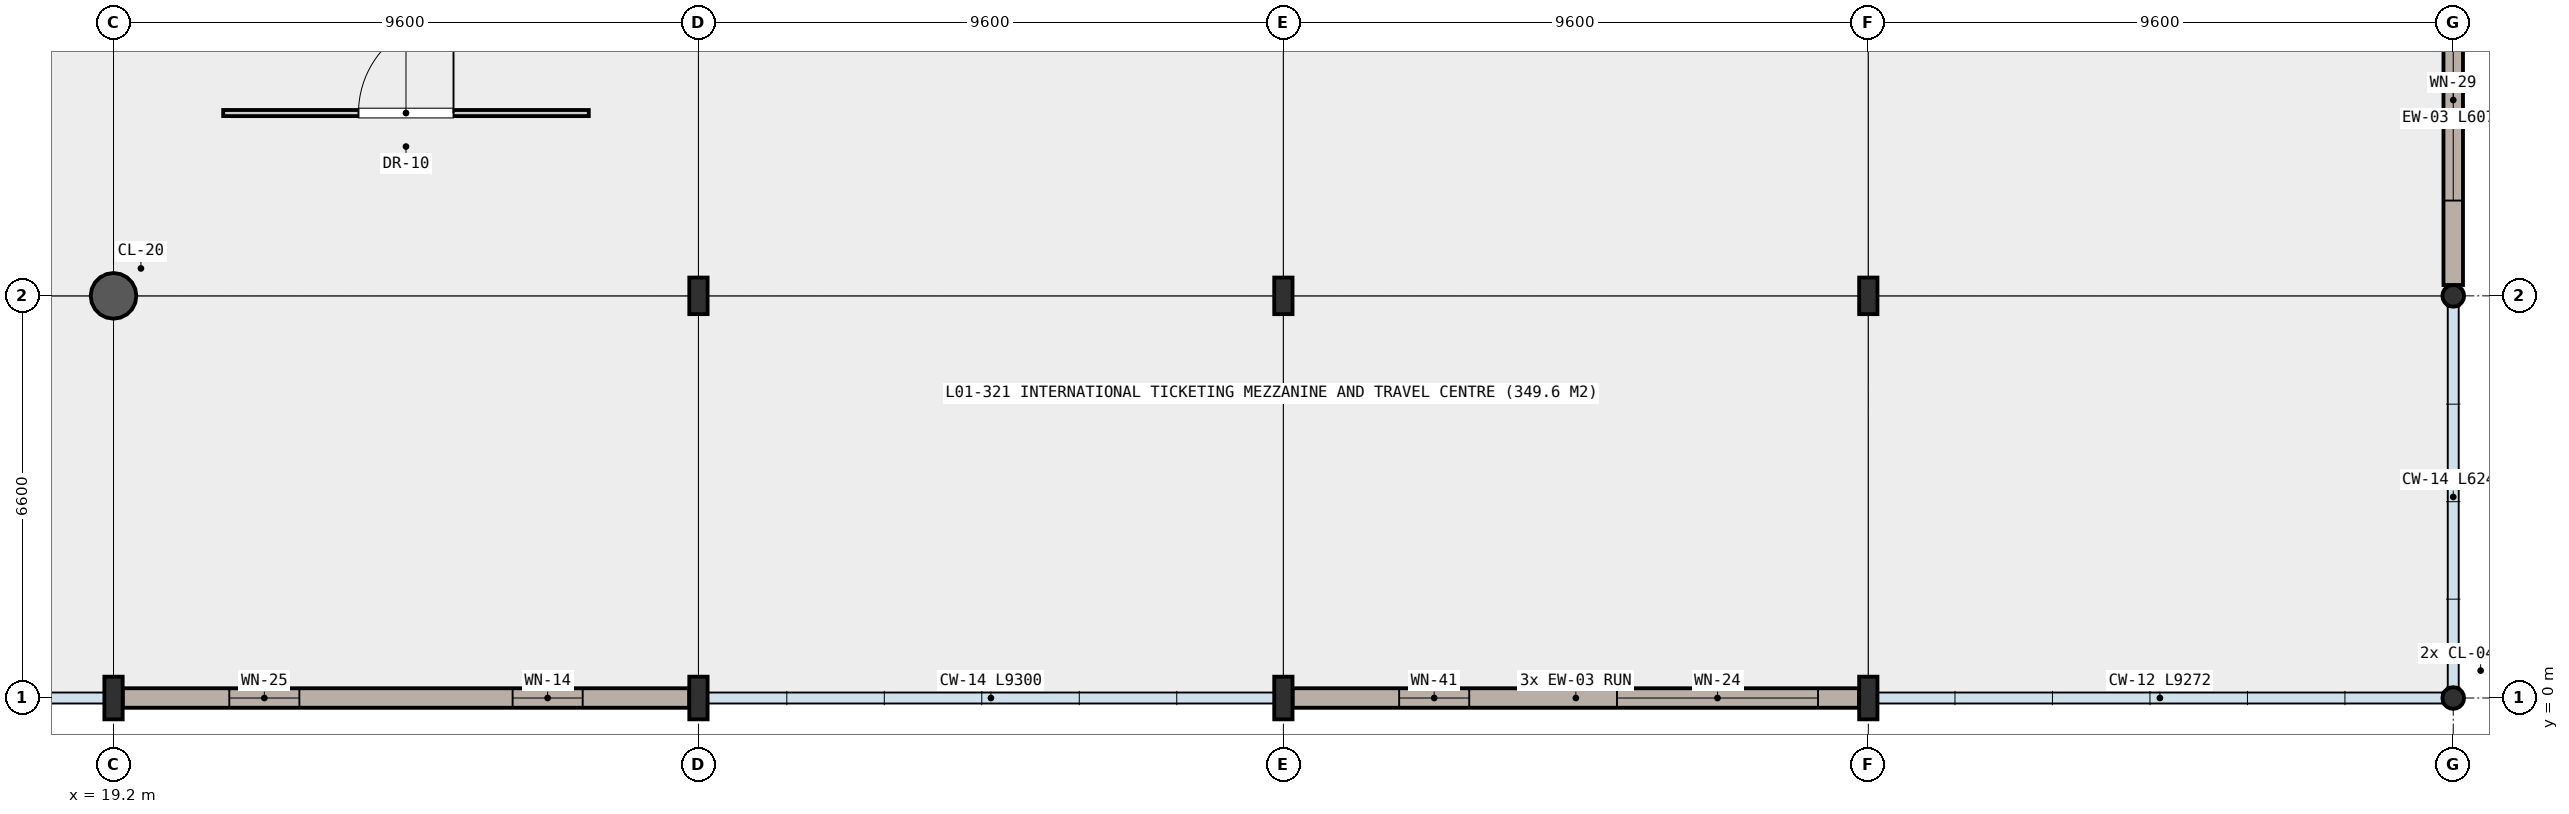
"""IFC4 building model, lengths in metres.
Left out: names, types, materials, properties, quantities, classifications, styles, units other than length and angle.
Written with IfcOpenShell. Run it as: python <this file> out.ifc"""

import sys

from ifc_helpers import new_model, si_unit, direction, frame, frame_2d, origin, origin_2d, place, context, subcontext, project, spatial, rectangle, circle, hollow_circle, i_section, extrude, element, fill, save


model = new_model("IFC4")
c1 = context("Model", 3, precision=1e-05, world=origin(), true_north=direction((0.0, 1.0)))
c2 = subcontext(c1, "Body", "Model", "MODEL_VIEW")
j1 = project(units=[si_unit("LENGTHUNIT", "METRE"), si_unit("PLANEANGLEUNIT", "RADIAN")], contexts=[c1])
p1 = place(None, origin())
s1 = spatial("IfcSite", under=j1, at=p1, CompositionType="ELEMENT")
p2 = place(p1, origin())
s2 = spatial("IfcBuilding", under=s1, at=p2, CompositionType="ELEMENT")
p3 = place(p2, frame((0.0, 0.0, 5.4)))
s3 = spatial("IfcBuildingStorey", under=s2, at=p3, CompositionType="ELEMENT", Elevation=5.4)
p4 = place(p3, frame((19.2, 0.0, 0.0), z_axis=(0.0, 0.0, 1.0), x_axis=(1.0, 0.0, 0.0)))
e1 = element("IfcColumn", 1, at=p4, inside=s3, PredefinedType="COLUMN", context=c2, shape_type="SweptSolid", body=[
    extrude(i_section(OverallWidth=0.3, OverallDepth=0.7, WebThickness=0.017, FlangeThickness=0.032, FilletRadius=0.027, at=origin_2d()), origin(), (0.0, 0.0, 1.0), 4.8),
])
p5 = place(p3, frame((19.2, 6.6, 0.0), z_axis=(0.0, 0.0, 1.0), x_axis=(1.0, 0.0, 0.0)))
e2 = element("IfcColumn", 2, at=p5, inside=s3, PredefinedType="COLUMN", context=c2, shape_type="SweptSolid", body=[
    extrude(circle(Radius=0.375, at=origin_2d()), origin(), (0.0, 0.0, 1.0), 4.8),
])
p6 = place(p3, frame((28.8, 0.0, 0.0), z_axis=(0.0, 0.0, 1.0), x_axis=(1.0, 0.0, 0.0)))
e3 = element("IfcColumn", 3, at=p6, inside=s3, PredefinedType="COLUMN", context=c2, shape_type="SweptSolid", body=[
    extrude(i_section(OverallWidth=0.3, OverallDepth=0.7, WebThickness=0.017, FlangeThickness=0.032, FilletRadius=0.027, at=origin_2d()), origin(), (0.0, 0.0, 1.0), 4.8),
])
p7 = place(p3, frame((28.8, 6.6, 0.0), z_axis=(0.0, 0.0, 1.0), x_axis=(1.0, 0.0, 0.0)))
e4 = element("IfcColumn", 4, at=p7, inside=s3, PredefinedType="COLUMN", context=c2, shape_type="SweptSolid", body=[
    extrude(i_section(OverallWidth=0.3, OverallDepth=0.6, WebThickness=0.015, FlangeThickness=0.03, FilletRadius=0.027, at=origin_2d()), origin(), (0.0, 0.0, 1.0), 4.8),
])
p8 = place(p3, frame((38.4, 0.0, 0.0), z_axis=(0.0, 0.0, 1.0), x_axis=(1.0, 0.0, 0.0)))
e5 = element("IfcColumn", 5, at=p8, inside=s3, PredefinedType="COLUMN", context=c2, shape_type="SweptSolid", body=[
    extrude(i_section(OverallWidth=0.3, OverallDepth=0.7, WebThickness=0.017, FlangeThickness=0.032, FilletRadius=0.027, at=origin_2d()), origin(), (0.0, 0.0, 1.0), 4.8),
])
p9 = place(p3, frame((38.4, 6.6, 0.0), z_axis=(0.0, 0.0, 1.0), x_axis=(1.0, 0.0, 0.0)))
e6 = element("IfcColumn", 6, at=p9, inside=s3, PredefinedType="COLUMN", context=c2, shape_type="SweptSolid", body=[
    extrude(i_section(OverallWidth=0.3, OverallDepth=0.6, WebThickness=0.015, FlangeThickness=0.03, FilletRadius=0.027, at=origin_2d()), origin(), (0.0, 0.0, 1.0), 4.8),
])
p10 = place(p3, frame((48.0, 0.0, 0.0), z_axis=(0.0, 0.0, 1.0), x_axis=(1.0, 0.0, 0.0)))
e7 = element("IfcColumn", 7, at=p10, inside=s3, PredefinedType="COLUMN", context=c2, shape_type="SweptSolid", body=[
    extrude(i_section(OverallWidth=0.3, OverallDepth=0.7, WebThickness=0.017, FlangeThickness=0.032, FilletRadius=0.027, at=origin_2d()), origin(), (0.0, 0.0, 1.0), 4.8),
])
p11 = place(p3, frame((48.0, 6.6, 0.0), z_axis=(0.0, 0.0, 1.0), x_axis=(1.0, 0.0, 0.0)))
e8 = element("IfcColumn", 8, at=p11, inside=s3, PredefinedType="COLUMN", context=c2, shape_type="SweptSolid", body=[
    extrude(i_section(OverallWidth=0.3, OverallDepth=0.6, WebThickness=0.015, FlangeThickness=0.03, FilletRadius=0.027, at=origin_2d()), origin(), (0.0, 0.0, 1.0), 4.8),
])
for number, where, z_axis, x_axis in (
    (9, (57.6, 0.0, 0.0), (0.0, 0.0, 1.0), (1.0, 0.0, 0.0)),
    (10, (57.6, 6.6, 0.0), (0.0, 0.0, 1.0), (1.0, 0.0, 0.0)),
):
    element("IfcColumn", number, at=place(p3, frame(where, z_axis=z_axis, x_axis=x_axis)), inside=s3, PredefinedType="COLUMN", context=c2, shape_type="SweptSolid", body=[
        extrude(hollow_circle(Radius=0.178, WallThickness=0.016, at=origin_2d()), origin(), (0.0, 0.0, 1.0), 4.788),
    ])
p12 = place(p3, frame((57.6, 12.85, 0.0), z_axis=(0.0, 0.0, 1.0), x_axis=(0.0, -1.0, 0.0)))
e11 = element("IfcWall", 11, at=p12, inside=s3, PredefinedType="SOLIDWALL", context=c2, shape_type="SweptSolid", body=[
    extrude(rectangle(XDim=6.072, YDim=0.32, at=frame_2d((3.036, 0.0))), origin(), (0.0, 0.0, 1.0), 4.05),
])
p13 = place(p12, frame((1.386, 0.0, 0.85)))
e12 = element("IfcOpeningElement", 12, at=p13, cuts=e11, PredefinedType="OPENING", context=c2, shape_type="SweptSolid", body=[
    extrude(rectangle(XDim=3.3, YDim=1.85, at=frame_2d((1.65, 0.925))), frame((0.0, 0.17, 0.0), z_axis=(0.0, -1.0, 0.0), x_axis=(1.0, 0.0, 0.0)), (0.0, 0.0, 1.0), 0.34),
])
p14 = place(p3, frame((47.85, 0.0, 0.0), z_axis=(0.0, 0.0, 1.0), x_axis=(-1.0, 0.0, 0.0)))
e13 = element("IfcWall", 13, at=p14, inside=s3, PredefinedType="SOLIDWALL", context=c2, shape_type="SweptSolid", body=[
    extrude(rectangle(XDim=9.3, YDim=0.32, at=frame_2d((4.65, 0.0))), origin(), (0.0, 0.0, 1.0), 4.11),
])
p15 = place(p14, frame((0.675, 0.0, 0.85)))
e14 = element("IfcOpeningElement", 14, at=p15, cuts=e13, PredefinedType="OPENING", context=c2, shape_type="SweptSolid", body=[
    extrude(rectangle(XDim=3.3, YDim=2.15, at=frame_2d((1.65, 1.075))), frame((0.0, 0.17, 0.0), z_axis=(0.0, -1.0, 0.0), x_axis=(1.0, 0.0, 0.0)), (0.0, 0.0, 1.0), 0.34),
])
p16 = place(p14, frame((6.4, 0.0, 0.85)))
e15 = element("IfcOpeningElement", 15, at=p16, cuts=e13, PredefinedType="OPENING", context=c2, shape_type="SweptSolid", body=[
    extrude(rectangle(XDim=1.15, YDim=1.5, at=frame_2d((0.575, 0.75))), frame((0.0, 0.17, 0.0), z_axis=(0.0, -1.0, 0.0), x_axis=(1.0, 0.0, 0.0)), (0.0, 0.0, 1.0), 0.34),
])
p17 = place(p3, frame((28.65, 0.0, 0.0), z_axis=(0.0, 0.0, 1.0), x_axis=(-1.0, 0.0, 0.0)))
e16 = element("IfcWall", 16, at=p17, inside=s3, PredefinedType="SOLIDWALL", context=c2, shape_type="SweptSolid", body=[
    extrude(rectangle(XDim=9.3, YDim=0.32, at=frame_2d((4.65, 0.0))), origin(), (0.0, 0.0, 1.0), 4.11),
])
p18 = place(p17, frame((1.75, 0.0, 0.85)))
e17 = element("IfcOpeningElement", 17, at=p18, cuts=e16, PredefinedType="OPENING", context=c2, shape_type="SweptSolid", body=[
    extrude(rectangle(XDim=1.15, YDim=1.85, at=frame_2d((0.575, 0.925))), frame((0.0, 0.17, 0.0), z_axis=(0.0, -1.0, 0.0), x_axis=(1.0, 0.0, 0.0)), (0.0, 0.0, 1.0), 0.34),
])
p19 = place(p17, frame((6.4, 0.0, 0.85)))
e18 = element("IfcOpeningElement", 18, at=p19, cuts=e16, PredefinedType="OPENING", context=c2, shape_type="SweptSolid", body=[
    extrude(rectangle(XDim=1.15, YDim=2.15, at=frame_2d((0.575, 1.075))), frame((0.0, 0.17, 0.0), z_axis=(0.0, -1.0, 0.0), x_axis=(1.0, 0.0, 0.0)), (0.0, 0.0, 1.0), 0.34),
])
p20 = place(p3, frame((21.0, 9.6, 0.0), z_axis=(0.0, 0.0, 1.0), x_axis=(1.0, 0.0, 0.0)))
e19 = element("IfcWall", 19, at=p20, inside=s3, PredefinedType="PARTITIONING", context=c2, shape_type="SweptSolid", body=[
    extrude(rectangle(XDim=6.0, YDim=0.1, at=frame_2d((3.0, 0.0))), origin(), (0.0, 0.0, 1.0), 4.54),
])
p21 = place(p20, frame((2.22, 0.0, 0.0)))
e20 = element("IfcOpeningElement", 20, at=p21, cuts=e19, PredefinedType="OPENING", context=c2, shape_type="SweptSolid", body=[
    extrude(rectangle(XDim=1.56, YDim=2.2, at=frame_2d((0.78, 1.1))), frame((0.0, 0.06, 0.0), z_axis=(0.0, -1.0, 0.0), x_axis=(1.0, 0.0, 0.0)), (0.0, 0.0, 1.0), 0.12),
])
p22 = place(p13, origin())
e21 = element("IfcWindow", 21, at=p22, inside=s3, PartitioningType="SINGLE_PANEL", PredefinedType="WINDOW", context=c2, shape_type="SweptSolid", body=[
    extrude(rectangle(XDim=3.3, YDim=1.85, at=frame_2d((1.65, 0.925))), frame((0.0, 0.03, 0.0), z_axis=(0.0, -1.0, 0.0), x_axis=(1.0, 0.0, 0.0)), (0.0, 0.0, 1.0), 0.06),
])
fill(e12, e21)
p23 = place(p15, origin())
e22 = element("IfcWindow", 22, at=p23, inside=s3, PartitioningType="SINGLE_PANEL", PredefinedType="WINDOW", context=c2, shape_type="SweptSolid", body=[
    extrude(rectangle(XDim=3.3, YDim=2.15, at=frame_2d((1.65, 1.075))), frame((0.0, 0.03, 0.0), z_axis=(0.0, -1.0, 0.0), x_axis=(1.0, 0.0, 0.0)), (0.0, 0.0, 1.0), 0.06),
])
fill(e14, e22)
p24 = place(p16, origin())
e23 = element("IfcWindow", 23, at=p24, inside=s3, PartitioningType="SINGLE_PANEL", PredefinedType="WINDOW", context=c2, shape_type="SweptSolid", body=[
    extrude(rectangle(XDim=1.15, YDim=1.5, at=frame_2d((0.575, 0.75))), frame((0.0, 0.03, 0.0), z_axis=(0.0, -1.0, 0.0), x_axis=(1.0, 0.0, 0.0)), (0.0, 0.0, 1.0), 0.06),
])
fill(e15, e23)
p25 = place(p18, origin())
e24 = element("IfcWindow", 24, at=p25, inside=s3, PartitioningType="SINGLE_PANEL", PredefinedType="WINDOW", context=c2, shape_type="SweptSolid", body=[
    extrude(rectangle(XDim=1.15, YDim=1.85, at=frame_2d((0.575, 0.925))), frame((0.0, 0.03, 0.0), z_axis=(0.0, -1.0, 0.0), x_axis=(1.0, 0.0, 0.0)), (0.0, 0.0, 1.0), 0.06),
])
fill(e17, e24)
p26 = place(p19, origin())
e25 = element("IfcWindow", 25, at=p26, inside=s3, PartitioningType="SINGLE_PANEL", PredefinedType="WINDOW", context=c2, shape_type="SweptSolid", body=[
    extrude(rectangle(XDim=1.15, YDim=2.15, at=frame_2d((0.575, 1.075))), frame((0.0, 0.03, 0.0), z_axis=(0.0, -1.0, 0.0), x_axis=(1.0, 0.0, 0.0)), (0.0, 0.0, 1.0), 0.06),
])
fill(e18, e25)
p27 = place(p21, origin())
e26 = element("IfcDoor", 26, at=p27, inside=s3, OperationType="SINGLE_SWING_RIGHT", PredefinedType="DOOR", context=c2, shape_type="SweptSolid", body=[
    extrude(rectangle(XDim=1.56, YDim=2.2, at=frame_2d((0.78, 1.1))), frame((0.0, 0.025, 0.0), z_axis=(0.0, -1.0, 0.0), x_axis=(1.0, 0.0, 0.0)), (0.0, 0.0, 1.0), 0.05),
])
fill(e20, e26)
save(model, sys.argv[1])
